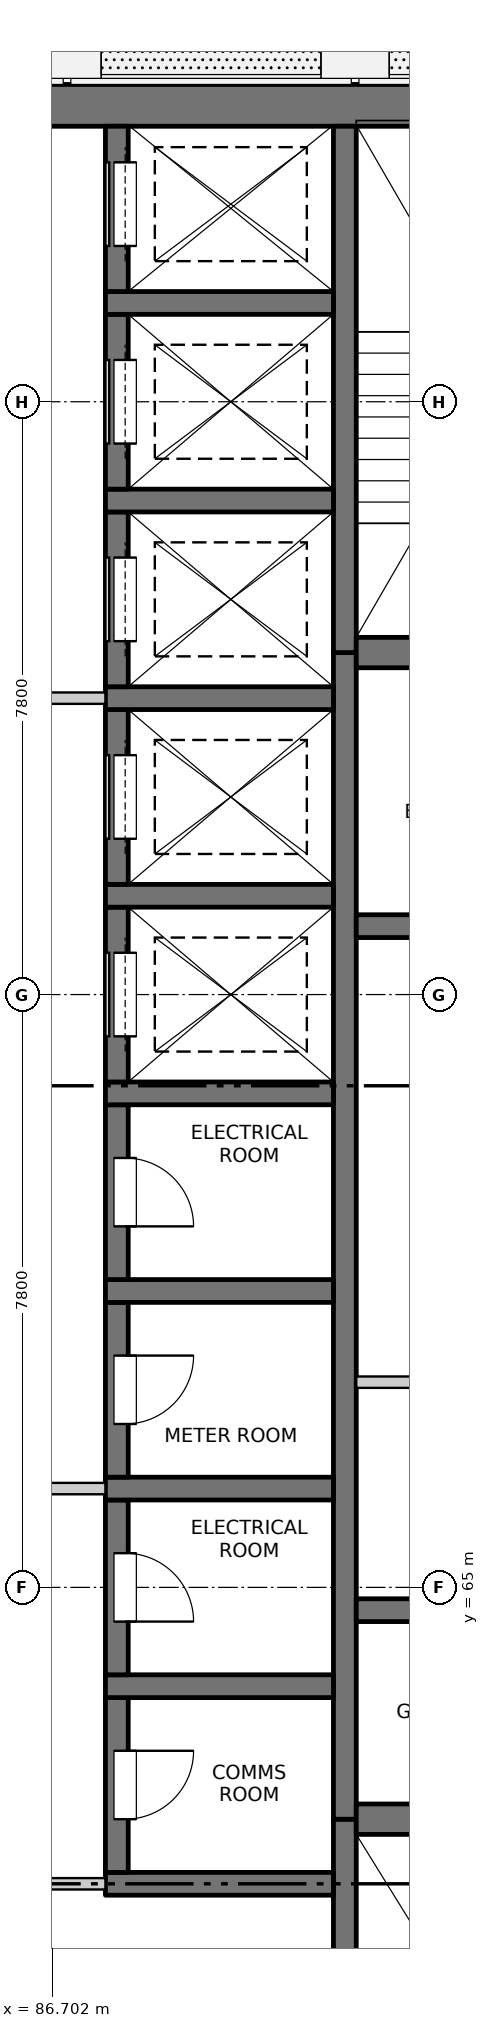
"""IFC4 building model, lengths in metres.
Left out: names, types, materials, properties, quantities, classifications, styles, units other than length and angle.
Written with IfcOpenShell. Run it as: python <this file> out.ifc"""

import sys

from ifc_helpers import new_model, si_unit, direction, frame, frame_2d, origin, place, context, subcontext, project, spatial, rectangle, extrude, element, fill, save


model = new_model("IFC4")
c1 = context("Model", 3, precision=1e-05, world=origin(), true_north=direction((0.0, 1.0)))
c2 = subcontext(c1, "Body", "Model", "MODEL_VIEW")
j1 = project(units=[si_unit("LENGTHUNIT", "METRE"), si_unit("PLANEANGLEUNIT", "RADIAN")], contexts=[c1])
p1 = place(None, origin())
s1 = spatial("IfcSite", under=j1, at=p1, CompositionType="ELEMENT")
p2 = place(p1, origin())
s2 = spatial("IfcBuilding", under=s1, at=p2, CompositionType="ELEMENT")
p3 = place(p2, frame((0.0, 0.0, 155.4)))
s3 = spatial("IfcBuildingStorey", under=s2, at=p3, CompositionType="ELEMENT", Elevation=155.4)
p4 = place(p3, frame((75.525, 84.5, -0.25), z_axis=(0.0, 0.0, 1.0), x_axis=(1.0, 0.0, 0.0)))
e1 = element("IfcWall", 1, at=p4, inside=s3, PredefinedType="SOLIDWALL", context=c2, shape_type="SweptSolid", body=[
    extrude(rectangle(XDim=18.95, YDim=0.55, at=frame_2d((9.475, 0.0))), origin(), (0.0, 0.0, 1.0), 3.4),
])
p5 = place(p3, frame((90.55, 55.525, -0.25), z_axis=(0.0, 0.0, 1.0), x_axis=(0.0, 1.0, 0.0)))
e2 = element("IfcWall", 2, at=p5, inside=s3, PredefinedType="SOLIDWALL", context=c2, shape_type="SweptSolid", body=[
    extrude(rectangle(XDim=6.425, YDim=0.3, at=frame_2d((3.212, 0.0))), origin(), (0.0, 0.0, 1.0), 3.4),
])
p6 = place(p5, frame((0.125, 0.0, 0.25)))
e3 = element("IfcOpeningElement", 3, at=p6, cuts=e2, PredefinedType="OPENING", context=c2, shape_type="SweptSolid", body=[
    extrude(rectangle(XDim=1.2, YDim=2.1, at=frame_2d((0.6, 1.05))), frame((0.0, 0.16, 0.0), z_axis=(0.0, -1.0, 0.0), x_axis=(1.0, 0.0, 0.0)), (0.0, 0.0, 1.0), 0.32),
])
p7 = place(p3, frame((90.55, 61.95, -0.25), z_axis=(0.0, 0.0, 1.0), x_axis=(0.0, 1.0, 0.0)))
e4 = element("IfcWall", 4, at=p7, inside=s3, PredefinedType="SOLIDWALL", context=c2, shape_type="SweptSolid", body=[
    extrude(rectangle(XDim=15.35, YDim=0.3, at=frame_2d((7.675, 0.0))), origin(), (0.0, 0.0, 1.0), 3.4),
])
p8 = place(p3, frame((90.55, 77.3, -0.25), z_axis=(0.0, 0.0, 1.0), x_axis=(0.0, 1.0, 0.0)))
e5 = element("IfcWall", 5, at=p8, inside=s3, PredefinedType="SOLIDWALL", context=c2, shape_type="SweptSolid", body=[
    extrude(rectangle(XDim=6.925, YDim=0.3, at=frame_2d((3.462, 0.0))), origin(), (0.0, 0.0, 1.0), 3.4),
])
p9 = place(p3, frame((87.4, 61.1, -0.25), z_axis=(0.0, 0.0, 1.0), x_axis=(1.0, 0.0, 0.0)))
e6 = element("IfcWall", 6, at=p9, inside=s3, PredefinedType="SOLIDWALL", context=c2, shape_type="SweptSolid", body=[
    extrude(rectangle(XDim=3.0, YDim=0.3, at=frame_2d((1.5, 0.0))), origin(), (0.0, 0.0, 1.0), 3.4),
])
p10 = place(p3, frame((87.55, 61.25, -0.25), z_axis=(0.0, 0.0, 1.0), x_axis=(0.0, 1.0, 0.0)))
e7 = element("IfcWall", 7, at=p10, inside=s3, PredefinedType="SOLIDWALL", context=c2, shape_type="SweptSolid", body=[
    extrude(rectangle(XDim=2.3, YDim=0.3, at=frame_2d((1.15, 0.0))), origin(), (0.0, 0.0, 1.0), 3.4),
])
p11 = place(p10, frame((0.7, 0.0, 0.25)))
e8 = element("IfcOpeningElement", 8, at=p11, cuts=e7, PredefinedType="OPENING", context=c2, shape_type="SweptSolid", body=[
    extrude(rectangle(XDim=0.9, YDim=2.1, at=frame_2d((0.45, 1.05))), frame((0.0, 0.16, 0.0), z_axis=(0.0, -1.0, 0.0), x_axis=(1.0, 0.0, 0.0)), (0.0, 0.0, 1.0), 0.32),
])
p12 = place(p3, frame((87.4, 63.7, -0.25), z_axis=(0.0, 0.0, 1.0), x_axis=(1.0, 0.0, 0.0)))
e9 = element("IfcWall", 9, at=p12, inside=s3, PredefinedType="SOLIDWALL", context=c2, shape_type="SweptSolid", body=[
    extrude(rectangle(XDim=3.0, YDim=0.3, at=frame_2d((1.5, 0.0))), origin(), (0.0, 0.0, 1.0), 3.4),
])
p13 = place(p3, frame((87.55, 63.85, -0.25), z_axis=(0.0, 0.0, 1.0), x_axis=(0.0, 1.0, 0.0)))
e10 = element("IfcWall", 10, at=p13, inside=s3, PredefinedType="SOLIDWALL", context=c2, shape_type="SweptSolid", body=[
    extrude(rectangle(XDim=2.3, YDim=0.3, at=frame_2d((1.15, 0.0))), origin(), (0.0, 0.0, 1.0), 3.4),
])
p14 = place(p13, frame((0.7, 0.0, 0.25)))
e11 = element("IfcOpeningElement", 11, at=p14, cuts=e10, PredefinedType="OPENING", context=c2, shape_type="SweptSolid", body=[
    extrude(rectangle(XDim=0.9, YDim=2.1, at=frame_2d((0.45, 1.05))), frame((0.0, 0.16, 0.0), z_axis=(0.0, -1.0, 0.0), x_axis=(1.0, 0.0, 0.0)), (0.0, 0.0, 1.0), 0.32),
])
p15 = place(p3, frame((87.4, 66.3, -0.25), z_axis=(0.0, 0.0, 1.0), x_axis=(1.0, 0.0, 0.0)))
e12 = element("IfcWall", 12, at=p15, inside=s3, PredefinedType="SOLIDWALL", context=c2, shape_type="SweptSolid", body=[
    extrude(rectangle(XDim=3.0, YDim=0.3, at=frame_2d((1.5, 0.0))), origin(), (0.0, 0.0, 1.0), 3.4),
])
p16 = place(p3, frame((87.55, 66.45, -0.25), z_axis=(0.0, 0.0, 1.0), x_axis=(0.0, 1.0, 0.0)))
e13 = element("IfcWall", 13, at=p16, inside=s3, PredefinedType="SOLIDWALL", context=c2, shape_type="SweptSolid", body=[
    extrude(rectangle(XDim=2.3, YDim=0.3, at=frame_2d((1.15, 0.0))), origin(), (0.0, 0.0, 1.0), 3.4),
])
p17 = place(p16, frame((0.7, 0.0, 0.25)))
e14 = element("IfcOpeningElement", 14, at=p17, cuts=e13, PredefinedType="OPENING", context=c2, shape_type="SweptSolid", body=[
    extrude(rectangle(XDim=0.9, YDim=2.1, at=frame_2d((0.45, 1.05))), frame((0.0, 0.16, 0.0), z_axis=(0.0, -1.0, 0.0), x_axis=(1.0, 0.0, 0.0)), (0.0, 0.0, 1.0), 0.32),
])
p18 = place(p3, frame((87.4, 68.9, -0.25), z_axis=(0.0, 0.0, 1.0), x_axis=(1.0, 0.0, 0.0)))
e15 = element("IfcWall", 15, at=p18, inside=s3, PredefinedType="SOLIDWALL", context=c2, shape_type="SweptSolid", body=[
    extrude(rectangle(XDim=3.0, YDim=0.3, at=frame_2d((1.5, 0.0))), origin(), (0.0, 0.0, 1.0), 3.4),
])
p19 = place(p3, frame((87.55, 69.05, -0.25), z_axis=(0.0, 0.0, 1.0), x_axis=(0.0, 1.0, 0.0)))
e16 = element("IfcWall", 16, at=p19, inside=s3, PredefinedType="SOLIDWALL", context=c2, shape_type="SweptSolid", body=[
    extrude(rectangle(XDim=2.3, YDim=0.3, at=frame_2d((1.15, 0.0))), origin(), (0.0, 0.0, 1.0), 3.4),
])
p20 = place(p19, frame((0.7, 0.0, 0.25)))
e17 = element("IfcOpeningElement", 17, at=p20, cuts=e16, PredefinedType="OPENING", context=c2, shape_type="SweptSolid", body=[
    extrude(rectangle(XDim=0.9, YDim=2.1, at=frame_2d((0.45, 1.05))), frame((0.0, 0.16, 0.0), z_axis=(0.0, -1.0, 0.0), x_axis=(1.0, 0.0, 0.0)), (0.0, 0.0, 1.0), 0.32),
])
p21 = place(p3, frame((87.4, 71.5, -0.25), z_axis=(0.0, 0.0, 1.0), x_axis=(1.0, 0.0, 0.0)))
e18 = element("IfcWall", 18, at=p21, inside=s3, PredefinedType="SOLIDWALL", context=c2, shape_type="SweptSolid", body=[
    extrude(rectangle(XDim=3.0, YDim=0.3, at=frame_2d((1.5, 0.0))), origin(), (0.0, 0.0, 1.0), 3.4),
])
p22 = place(p3, frame((87.55, 71.65, -0.25), z_axis=(0.0, 0.0, 1.0), x_axis=(0.0, 1.0, 0.0)))
e19 = element("IfcWall", 19, at=p22, inside=s3, PredefinedType="SOLIDWALL", context=c2, shape_type="SweptSolid", body=[
    extrude(rectangle(XDim=2.3, YDim=0.3, at=frame_2d((1.15, 0.0))), origin(), (0.0, 0.0, 1.0), 3.4),
])
p23 = place(p22, frame((0.6, 0.0, 0.25)))
e20 = element("IfcOpeningElement", 20, at=p23, cuts=e19, PredefinedType="OPENING", context=c2, shape_type="SweptSolid", body=[
    extrude(rectangle(XDim=1.1, YDim=2.1, at=frame_2d((0.55, 1.05))), frame((0.0, 0.16, 0.0), z_axis=(0.0, -1.0, 0.0), x_axis=(1.0, 0.0, 0.0)), (0.0, 0.0, 1.0), 0.32),
])
p24 = place(p3, frame((87.4, 74.1, -0.25), z_axis=(0.0, 0.0, 1.0), x_axis=(1.0, 0.0, 0.0)))
e21 = element("IfcWall", 21, at=p24, inside=s3, PredefinedType="SOLIDWALL", context=c2, shape_type="SweptSolid", body=[
    extrude(rectangle(XDim=3.0, YDim=0.3, at=frame_2d((1.5, 0.0))), origin(), (0.0, 0.0, 1.0), 3.4),
])
p25 = place(p3, frame((87.55, 74.25, -0.25), z_axis=(0.0, 0.0, 1.0), x_axis=(0.0, 1.0, 0.0)))
e22 = element("IfcWall", 22, at=p25, inside=s3, PredefinedType="SOLIDWALL", context=c2, shape_type="SweptSolid", body=[
    extrude(rectangle(XDim=2.3, YDim=0.3, at=frame_2d((1.15, 0.0))), origin(), (0.0, 0.0, 1.0), 3.4),
])
p26 = place(p25, frame((0.6, 0.0, 0.25)))
e23 = element("IfcOpeningElement", 23, at=p26, cuts=e22, PredefinedType="OPENING", context=c2, shape_type="SweptSolid", body=[
    extrude(rectangle(XDim=1.1, YDim=2.1, at=frame_2d((0.55, 1.05))), frame((0.0, 0.16, 0.0), z_axis=(0.0, -1.0, 0.0), x_axis=(1.0, 0.0, 0.0)), (0.0, 0.0, 1.0), 0.32),
])
p27 = place(p3, frame((87.4, 76.7, -0.25), z_axis=(0.0, 0.0, 1.0), x_axis=(1.0, 0.0, 0.0)))
e24 = element("IfcWall", 24, at=p27, inside=s3, PredefinedType="SOLIDWALL", context=c2, shape_type="SweptSolid", body=[
    extrude(rectangle(XDim=3.0, YDim=0.3, at=frame_2d((1.5, 0.0))), origin(), (0.0, 0.0, 1.0), 3.4),
])
p28 = place(p3, frame((87.55, 76.85, -0.25), z_axis=(0.0, 0.0, 1.0), x_axis=(0.0, 1.0, 0.0)))
e25 = element("IfcWall", 25, at=p28, inside=s3, PredefinedType="SOLIDWALL", context=c2, shape_type="SweptSolid", body=[
    extrude(rectangle(XDim=2.3, YDim=0.3, at=frame_2d((1.15, 0.0))), origin(), (0.0, 0.0, 1.0), 3.4),
])
p29 = place(p28, frame((0.6, 0.0, 0.25)))
e26 = element("IfcOpeningElement", 26, at=p29, cuts=e25, PredefinedType="OPENING", context=c2, shape_type="SweptSolid", body=[
    extrude(rectangle(XDim=1.1, YDim=2.1, at=frame_2d((0.55, 1.05))), frame((0.0, 0.16, 0.0), z_axis=(0.0, -1.0, 0.0), x_axis=(1.0, 0.0, 0.0)), (0.0, 0.0, 1.0), 0.32),
])
p30 = place(p3, frame((87.4, 79.3, -0.25), z_axis=(0.0, 0.0, 1.0), x_axis=(1.0, 0.0, 0.0)))
e27 = element("IfcWall", 27, at=p30, inside=s3, PredefinedType="SOLIDWALL", context=c2, shape_type="SweptSolid", body=[
    extrude(rectangle(XDim=3.0, YDim=0.3, at=frame_2d((1.5, 0.0))), origin(), (0.0, 0.0, 1.0), 3.4),
])
p31 = place(p3, frame((87.55, 79.45, -0.25), z_axis=(0.0, 0.0, 1.0), x_axis=(0.0, 1.0, 0.0)))
e28 = element("IfcWall", 28, at=p31, inside=s3, PredefinedType="SOLIDWALL", context=c2, shape_type="SweptSolid", body=[
    extrude(rectangle(XDim=2.3, YDim=0.3, at=frame_2d((1.15, 0.0))), origin(), (0.0, 0.0, 1.0), 3.4),
])
p32 = place(p31, frame((0.6, 0.0, 0.25)))
e29 = element("IfcOpeningElement", 29, at=p32, cuts=e28, PredefinedType="OPENING", context=c2, shape_type="SweptSolid", body=[
    extrude(rectangle(XDim=1.1, YDim=2.1, at=frame_2d((0.55, 1.05))), frame((0.0, 0.16, 0.0), z_axis=(0.0, -1.0, 0.0), x_axis=(1.0, 0.0, 0.0)), (0.0, 0.0, 1.0), 0.32),
])
p33 = place(p3, frame((87.4, 81.9, -0.25), z_axis=(0.0, 0.0, 1.0), x_axis=(1.0, 0.0, 0.0)))
e30 = element("IfcWall", 30, at=p33, inside=s3, PredefinedType="SOLIDWALL", context=c2, shape_type="SweptSolid", body=[
    extrude(rectangle(XDim=3.0, YDim=0.3, at=frame_2d((1.5, 0.0))), origin(), (0.0, 0.0, 1.0), 3.4),
])
p34 = place(p3, frame((87.55, 82.05, -0.25), z_axis=(0.0, 0.0, 1.0), x_axis=(0.0, 1.0, 0.0)))
e31 = element("IfcWall", 31, at=p34, inside=s3, PredefinedType="SOLIDWALL", context=c2, shape_type="SweptSolid", body=[
    extrude(rectangle(XDim=2.175, YDim=0.3, at=frame_2d((1.087, 0.0))), origin(), (0.0, 0.0, 1.0), 3.4),
])
p35 = place(p34, frame((0.6, 0.0, 0.25)))
e32 = element("IfcOpeningElement", 32, at=p35, cuts=e31, PredefinedType="OPENING", context=c2, shape_type="SweptSolid", body=[
    extrude(rectangle(XDim=1.1, YDim=2.1, at=frame_2d((0.55, 1.05))), frame((0.0, 0.16, 0.0), z_axis=(0.0, -1.0, 0.0), x_axis=(1.0, 0.0, 0.0)), (0.0, 0.0, 1.0), 0.32),
])
p36 = place(p3, frame((90.7, 61.95, -0.25), z_axis=(0.0, 0.0, 1.0), x_axis=(1.0, 0.0, 0.0)))
e33 = element("IfcWall", 33, at=p36, inside=s3, PredefinedType="SOLIDWALL", context=c2, shape_type="SweptSolid", body=[
    extrude(rectangle(XDim=3.775, YDim=0.4, at=frame_2d((1.888, 0.0))), origin(), (0.0, 0.0, 1.0), 3.4),
])
for number, where, z_axis, x_axis in (
    (34, (90.7, 64.7, -0.25), (0.0, 0.0, 1.0), (1.0, 0.0, 0.0)),
    (35, (90.7, 73.7, -0.25), (0.0, 0.0, 1.0), (1.0, 0.0, 0.0)),
):
    element("IfcWall", number, at=place(p3, frame(where, z_axis=z_axis, x_axis=x_axis)), inside=s3, PredefinedType="SOLIDWALL", context=c2, shape_type="SweptSolid", body=[
        extrude(rectangle(XDim=3.775, YDim=0.3, at=frame_2d((1.888, 0.0))), origin(), (0.0, 0.0, 1.0), 3.4),
    ])
p37 = place(p3, frame((90.7, 77.3, -0.25), z_axis=(0.0, 0.0, 1.0), x_axis=(1.0, 0.0, 0.0)))
e36 = element("IfcWall", 36, at=p37, inside=s3, PredefinedType="SOLIDWALL", context=c2, shape_type="SweptSolid", body=[
    extrude(rectangle(XDim=3.775, YDim=0.4, at=frame_2d((1.888, 0.0))), origin(), (0.0, 0.0, 1.0), 3.4),
])
p38 = place(p3, frame((82.6, 61.1, 0.0), z_axis=(0.0, 0.0, 1.0), x_axis=(1.0, 0.0, 0.0)))
e37 = element("IfcWall", 37, at=p38, inside=s3, PredefinedType="PARTITIONING", context=c2, shape_type="SweptSolid", body=[
    extrude(rectangle(XDim=4.8, YDim=0.15, at=frame_2d((2.4, 0.0))), origin(), (0.0, 0.0, 1.0), 3.15),
])
p39 = place(p38, frame((1.5, 0.0, 0.0)))
e38 = element("IfcOpeningElement", 38, at=p39, cuts=e37, PredefinedType="OPENING", context=c2, shape_type="SweptSolid", body=[
    extrude(rectangle(XDim=1.8, YDim=2.1, at=frame_2d((0.9, 1.05))), frame((0.0, 0.085, 0.0), z_axis=(0.0, -1.0, 0.0), x_axis=(1.0, 0.0, 0.0)), (0.0, 0.0, 1.0), 0.17),
])
p40 = place(p3, frame((82.6, 66.3, 0.0), z_axis=(0.0, 0.0, 1.0), x_axis=(1.0, 0.0, 0.0)))
e39 = element("IfcWall", 39, at=p40, inside=s3, PredefinedType="PARTITIONING", context=c2, shape_type="SweptSolid", body=[
    extrude(rectangle(XDim=4.8, YDim=0.15, at=frame_2d((2.4, 0.0))), origin(), (0.0, 0.0, 1.0), 3.15),
])
p41 = place(p40, frame((1.5, 0.0, 0.0)))
e40 = element("IfcOpeningElement", 40, at=p41, cuts=e39, PredefinedType="OPENING", context=c2, shape_type="SweptSolid", body=[
    extrude(rectangle(XDim=1.8, YDim=2.1, at=frame_2d((0.9, 1.05))), frame((0.0, 0.085, 0.0), z_axis=(0.0, -1.0, 0.0), x_axis=(1.0, 0.0, 0.0)), (0.0, 0.0, 1.0), 0.17),
])
p42 = place(p3, frame((90.7, 67.7, 0.0), z_axis=(0.0, 0.0, 1.0), x_axis=(1.0, 0.0, 0.0)))
e41 = element("IfcWall", 41, at=p42, inside=s3, PredefinedType="PARTITIONING", context=c2, shape_type="SweptSolid", body=[
    extrude(rectangle(XDim=3.775, YDim=0.15, at=frame_2d((1.887, 0.0))), origin(), (0.0, 0.0, 1.0), 3.15),
])
p43 = place(p3, frame((82.6, 76.7, 0.0), z_axis=(0.0, 0.0, 1.0), x_axis=(1.0, 0.0, 0.0)))
e42 = element("IfcWall", 42, at=p43, inside=s3, PredefinedType="PARTITIONING", context=c2, shape_type="SweptSolid", body=[
    extrude(rectangle(XDim=4.8, YDim=0.15, at=frame_2d((2.4, 0.0))), origin(), (0.0, 0.0, 1.0), 3.15),
])
p44 = place(p43, frame((1.5, 0.0, 0.0)))
e43 = element("IfcOpeningElement", 43, at=p44, cuts=e42, PredefinedType="OPENING", context=c2, shape_type="SweptSolid", body=[
    extrude(rectangle(XDim=1.8, YDim=2.1, at=frame_2d((0.9, 1.05))), frame((0.0, 0.085, 0.0), z_axis=(0.0, -1.0, 0.0), x_axis=(1.0, 0.0, 0.0)), (0.0, 0.0, 1.0), 0.17),
])
p45 = place(p11, origin())
e44 = element("IfcDoor", 44, at=p45, inside=s3, OperationType="SINGLE_SWING_LEFT", PredefinedType="DOOR", context=c2, shape_type="SweptSolid", body=[
    extrude(rectangle(XDim=0.9, YDim=2.1, at=frame_2d((0.45, 1.05))), frame((0.0, -0.085, 0.0), z_axis=(0.0, -1.0, 0.0), x_axis=(1.0, 0.0, 0.0)), (0.0, 0.0, 1.0), 0.05),
])
fill(e8, e44)
p46 = place(p14, origin())
e45 = element("IfcDoor", 45, at=p46, inside=s3, OperationType="SINGLE_SWING_RIGHT", PredefinedType="DOOR", context=c2, shape_type="SweptSolid", body=[
    extrude(rectangle(XDim=0.9, YDim=2.1, at=frame_2d((0.45, 1.05))), frame((0.0, -0.085, 0.0), z_axis=(0.0, -1.0, 0.0), x_axis=(1.0, 0.0, 0.0)), (0.0, 0.0, 1.0), 0.05),
])
fill(e11, e45)
p47 = place(p17, origin())
e46 = element("IfcDoor", 46, at=p47, inside=s3, OperationType="SINGLE_SWING_LEFT", PredefinedType="DOOR", context=c2, shape_type="SweptSolid", body=[
    extrude(rectangle(XDim=0.9, YDim=2.1, at=frame_2d((0.45, 1.05))), frame((0.0, -0.085, 0.0), z_axis=(0.0, -1.0, 0.0), x_axis=(1.0, 0.0, 0.0)), (0.0, 0.0, 1.0), 0.05),
])
fill(e14, e46)
p48 = place(p20, origin())
e47 = element("IfcDoor", 47, at=p48, inside=s3, OperationType="SINGLE_SWING_RIGHT", PredefinedType="DOOR", context=c2, shape_type="SweptSolid", body=[
    extrude(rectangle(XDim=0.9, YDim=2.1, at=frame_2d((0.45, 1.05))), frame((0.0, -0.085, 0.0), z_axis=(0.0, -1.0, 0.0), x_axis=(1.0, 0.0, 0.0)), (0.0, 0.0, 1.0), 0.05),
])
fill(e17, e47)
p49 = place(p23, origin())
e48 = element("IfcDoor", 48, at=p49, inside=s3, OperationType="SLIDING_TO_LEFT", PredefinedType="DOOR", context=c2, shape_type="SweptSolid", body=[
    extrude(rectangle(XDim=1.1, YDim=2.1, at=frame_2d((0.55, 1.05))), frame((0.0, -0.085, 0.0), z_axis=(0.0, -1.0, 0.0), x_axis=(1.0, 0.0, 0.0)), (0.0, 0.0, 1.0), 0.05),
])
fill(e20, e48)
p50 = place(p26, origin())
e49 = element("IfcDoor", 49, at=p50, inside=s3, OperationType="SLIDING_TO_LEFT", PredefinedType="DOOR", context=c2, shape_type="SweptSolid", body=[
    extrude(rectangle(XDim=1.1, YDim=2.1, at=frame_2d((0.55, 1.05))), frame((0.0, -0.085, 0.0), z_axis=(0.0, -1.0, 0.0), x_axis=(1.0, 0.0, 0.0)), (0.0, 0.0, 1.0), 0.05),
])
fill(e23, e49)
p51 = place(p29, origin())
e50 = element("IfcDoor", 50, at=p51, inside=s3, OperationType="SLIDING_TO_LEFT", PredefinedType="DOOR", context=c2, shape_type="SweptSolid", body=[
    extrude(rectangle(XDim=1.1, YDim=2.1, at=frame_2d((0.55, 1.05))), frame((0.0, -0.085, 0.0), z_axis=(0.0, -1.0, 0.0), x_axis=(1.0, 0.0, 0.0)), (0.0, 0.0, 1.0), 0.05),
])
fill(e26, e50)
p52 = place(p32, origin())
e51 = element("IfcDoor", 51, at=p52, inside=s3, OperationType="SLIDING_TO_RIGHT", PredefinedType="DOOR", context=c2, shape_type="SweptSolid", body=[
    extrude(rectangle(XDim=1.1, YDim=2.1, at=frame_2d((0.55, 1.05))), frame((0.0, -0.085, 0.0), z_axis=(0.0, -1.0, 0.0), x_axis=(1.0, 0.0, 0.0)), (0.0, 0.0, 1.0), 0.05),
])
fill(e29, e51)
p53 = place(p35, origin())
e52 = element("IfcDoor", 52, at=p53, inside=s3, OperationType="SLIDING_TO_RIGHT", PredefinedType="DOOR", context=c2, shape_type="SweptSolid", body=[
    extrude(rectangle(XDim=1.1, YDim=2.1, at=frame_2d((0.55, 1.05))), frame((0.0, -0.085, 0.0), z_axis=(0.0, -1.0, 0.0), x_axis=(1.0, 0.0, 0.0)), (0.0, 0.0, 1.0), 0.05),
])
fill(e32, e52)
save(model, sys.argv[1])
